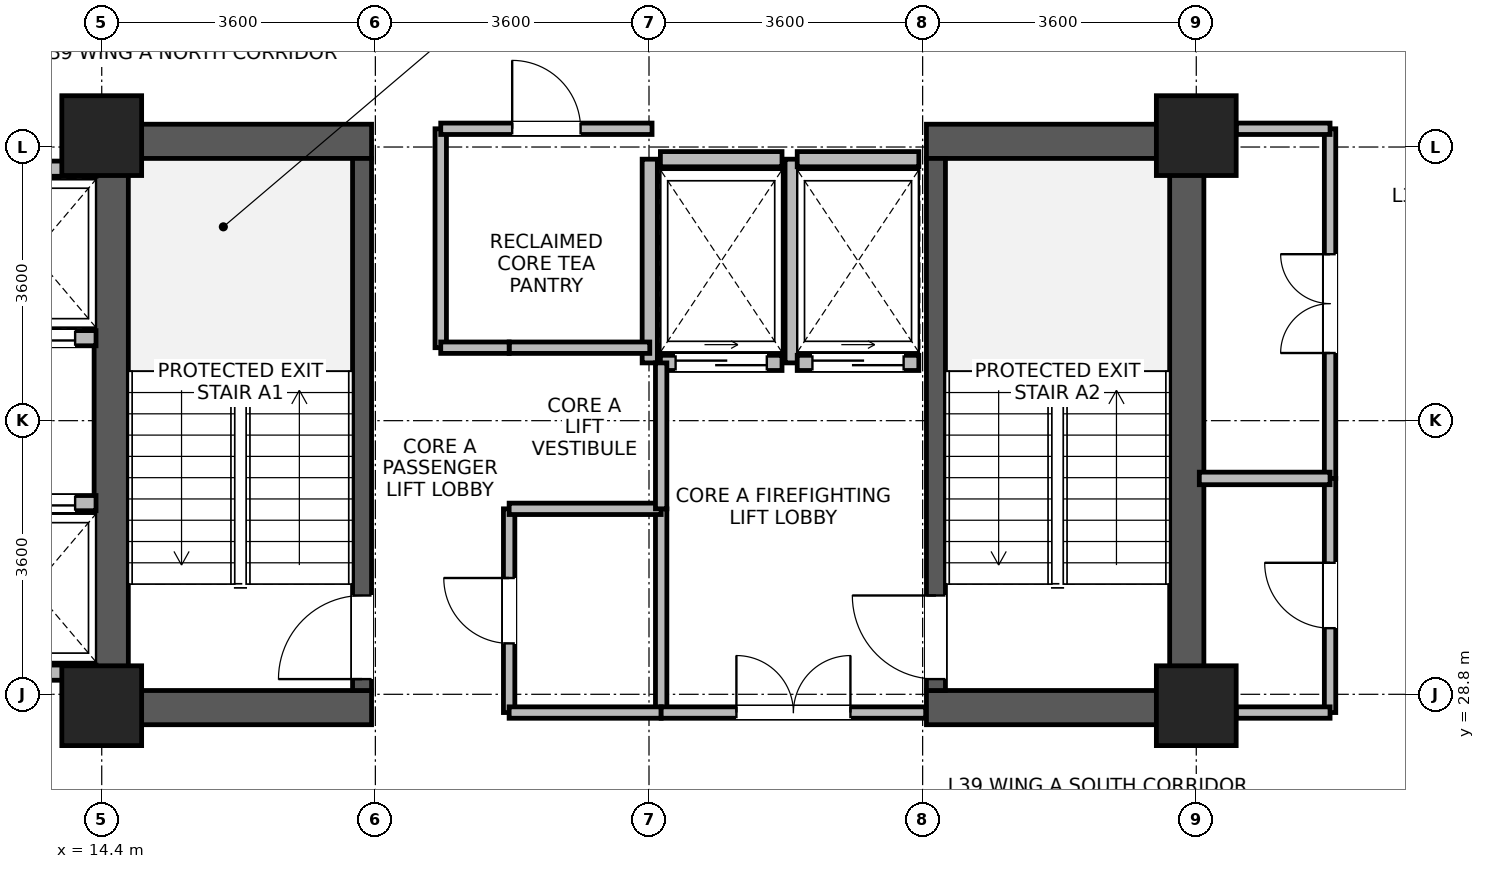
"""IFC4 building model, lengths in metres.
Left out: names, types, materials, properties, quantities, classifications, styles, units other than length and angle.
Written with IfcOpenShell. Run it as: python <this file> out.ifc"""

import sys

from ifc_helpers import new_model, si_unit, direction, frame, frame_2d, origin, origin_2d, place, context, subcontext, project, spatial, rectangle, extrude, source, transform, mapped, element, fill, save


model = new_model("IFC4")
c1 = context("Model", 3, precision=1e-05, world=origin(), true_north=direction((0.0, 1.0)))
c2 = subcontext(c1, "Body", "Model", "MODEL_VIEW")
j1 = project(units=[si_unit("LENGTHUNIT", "METRE"), si_unit("PLANEANGLEUNIT", "RADIAN")], contexts=[c1])
p1 = place(None, origin())
s1 = spatial("IfcSite", under=j1, at=p1, CompositionType="ELEMENT")
p2 = place(p1, origin())
s2 = spatial("IfcBuilding", under=s1, at=p2, CompositionType="ELEMENT")
p3 = place(p2, frame((0.0, 0.0, 155.0)))
s3 = spatial("IfcBuildingStorey", under=s2, at=p3, CompositionType="ELEMENT", Elevation=155.0)
for number, where, z_axis, x_axis in (
    (1, (14.525, 28.4, 0.0), (0.0, 0.0, 1.0), (0.0, 1.0, 0.0)),
    (2, (28.675, 28.4, 0.0), (0.0, 0.0, 1.0), (0.0, 1.0, 0.0)),
):
    element("IfcWall", number, at=place(p3, frame(where, z_axis=z_axis, x_axis=x_axis)), inside=s3, PredefinedType="SHEAR", context=c2, shape_type="SweptSolid", body=[
        extrude(rectangle(XDim=7.9, YDim=0.45, at=frame_2d((3.95, 0.0))), origin(), (0.0, 0.0, 1.0), 3.46),
    ])
for number, where, z_axis, x_axis in (
    (3, (14.75, 28.625, 0.0), (0.0, 0.0, 1.0), (1.0, 0.0, 0.0)),
    (4, (25.25, 28.625, 0.0), (0.0, 0.0, 1.0), (1.0, 0.0, 0.0)),
    (5, (14.75, 36.075, 0.0), (0.0, 0.0, 1.0), (1.0, 0.0, 0.0)),
    (6, (25.25, 36.075, 0.0), (0.0, 0.0, 1.0), (1.0, 0.0, 0.0)),
):
    element("IfcWall", number, at=place(p3, frame(where, z_axis=z_axis, x_axis=x_axis)), inside=s3, PredefinedType="SHEAR", context=c2, shape_type="SweptSolid", body=[
        extrude(rectangle(XDim=3.2, YDim=0.45, at=frame_2d((1.6, 0.0))), origin(), (0.0, 0.0, 1.0), 3.46),
    ])
p4 = place(p3, frame((17.825, 28.85, 0.0), z_axis=(0.0, 0.0, 1.0), x_axis=(0.0, 1.0, 0.0)))
e7 = element("IfcWall", 7, at=p4, inside=s3, PredefinedType="SHEAR", context=c2, shape_type="SweptSolid", body=[
    extrude(rectangle(XDim=7.0, YDim=0.25, at=frame_2d((3.5, 0.0))), origin(), (0.0, 0.0, 1.0), 3.46),
])
p5 = place(p4, frame((0.15, 0.0, 0.0)))
e8 = element("IfcOpeningElement", 8, at=p5, cuts=e7, PredefinedType="OPENING", context=c2, shape_type="SweptSolid", body=[
    extrude(rectangle(XDim=1.1, YDim=2.08, at=frame_2d((0.55, 1.04))), frame((0.0, 0.135, 0.0), z_axis=(0.0, -1.0, 0.0), x_axis=(1.0, 0.0, 0.0)), (0.0, 0.0, 1.0), 0.27),
])
p6 = place(p3, frame((25.375, 28.85, 0.0), z_axis=(0.0, 0.0, 1.0), x_axis=(0.0, 1.0, 0.0)))
e9 = element("IfcWall", 9, at=p6, inside=s3, PredefinedType="SHEAR", context=c2, shape_type="SweptSolid", body=[
    extrude(rectangle(XDim=7.0, YDim=0.25, at=frame_2d((3.5, 0.0))), origin(), (0.0, 0.0, 1.0), 3.46),
])
p7 = place(p6, frame((0.15, 0.0, 0.0)))
e10 = element("IfcOpeningElement", 10, at=p7, cuts=e9, PredefinedType="OPENING", context=c2, shape_type="SweptSolid", body=[
    extrude(rectangle(XDim=1.1, YDim=2.08, at=frame_2d((0.55, 1.04))), frame((0.0, 0.135, 0.0), z_axis=(0.0, -1.0, 0.0), x_axis=(1.0, 0.0, 0.0)), (0.0, 0.0, 1.0), 0.27),
])
m1 = source(origin(), c2, "Body", "SweptSolid", [
    extrude(rectangle(XDim=1.05, YDim=1.05, at=origin_2d()), origin(), (0.0, 0.0, 1.0), 3.7),
])
for number, where, z_axis, x_axis in (
    (11, (14.4, 28.65, 0.0), (0.0, 0.0, 1.0), (1.0, 0.0, 0.0)),
    (12, (14.4, 36.15, 0.0), (0.0, 0.0, 1.0), (1.0, 0.0, 0.0)),
    (13, (28.8, 28.65, 0.0), (0.0, 0.0, 1.0), (1.0, 0.0, 0.0)),
    (14, (28.8, 36.15, 0.0), (0.0, 0.0, 1.0), (1.0, 0.0, 0.0)),
):
    element("IfcColumn", number, at=place(p3, frame(where, z_axis=z_axis, x_axis=x_axis)), inside=s3, PredefinedType="COLUMN", context=c2, shape_type="MappedRepresentation", body=[
        mapped(m1, transform((0.0, 0.0, 0.0), x_axis=(1.0, 0.0, 0.0), y_axis=(0.0, 1.0, 0.0), z_axis=(0.0, 0.0, 1.0), scale=1.0)),
    ])
p8 = place(p3, frame((12.675, 33.485, 0.0), z_axis=(0.0, 0.0, 1.0), x_axis=(1.0, 0.0, 0.0)))
e15 = element("IfcWall", 15, at=p8, inside=s3, PredefinedType="PARTITIONING", context=c2, shape_type="SweptSolid", body=[
    extrude(rectangle(XDim=1.65, YDim=0.2, at=frame_2d((0.825, 0.0))), origin(), (0.0, 0.0, 1.0), 3.44),
])
p9 = place(p8, frame((0.275, 0.0, 0.0)))
e16 = element("IfcOpeningElement", 16, at=p9, cuts=e15, PredefinedType="OPENING", context=c2, shape_type="SweptSolid", body=[
    extrude(rectangle(XDim=1.1, YDim=2.12, at=frame_2d((0.55, 1.06))), frame((0.0, 0.11, 0.0), z_axis=(0.0, -1.0, 0.0), x_axis=(1.0, 0.0, 0.0)), (0.0, 0.0, 1.0), 0.22),
])
for number, where, z_axis, x_axis in (
    (17, (12.675, 35.715, 0.0), (0.0, 0.0, 1.0), (1.0, 0.0, 0.0)),
    (18, (12.675, 29.085, 0.0), (0.0, 0.0, 1.0), (1.0, 0.0, 0.0)),
):
    element("IfcWall", number, at=place(p3, frame(where, z_axis=z_axis, x_axis=x_axis)), inside=s3, PredefinedType="PARTITIONING", context=c2, shape_type="SweptSolid", body=[
        extrude(rectangle(XDim=1.65, YDim=0.2, at=frame_2d((0.825, 0.0))), origin(), (0.0, 0.0, 1.0), 3.44),
    ])
p10 = place(p3, frame((12.675, 31.315, 0.0), z_axis=(0.0, 0.0, 1.0), x_axis=(1.0, 0.0, 0.0)))
e19 = element("IfcWall", 19, at=p10, inside=s3, PredefinedType="PARTITIONING", context=c2, shape_type="SweptSolid", body=[
    extrude(rectangle(XDim=1.65, YDim=0.2, at=frame_2d((0.825, 0.0))), origin(), (0.0, 0.0, 1.0), 3.44),
])
p11 = place(p10, frame((0.275, 0.0, 0.0)))
e20 = element("IfcOpeningElement", 20, at=p11, cuts=e19, PredefinedType="OPENING", context=c2, shape_type="SweptSolid", body=[
    extrude(rectangle(XDim=1.1, YDim=2.12, at=frame_2d((0.55, 1.06))), frame((0.0, 0.11, 0.0), z_axis=(0.0, -1.0, 0.0), x_axis=(1.0, 0.0, 0.0)), (0.0, 0.0, 1.0), 0.22),
])
p12 = place(p3, frame((21.75, 33.16, 0.0), z_axis=(0.0, 0.0, 1.0), x_axis=(1.0, 0.0, 0.0)))
e21 = element("IfcWall", 21, at=p12, inside=s3, PredefinedType="PARTITIONING", context=c2, shape_type="SweptSolid", body=[
    extrude(rectangle(XDim=1.6, YDim=0.2, at=frame_2d((0.8, 0.0))), origin(), (0.0, 0.0, 1.0), 3.44),
])
p13 = place(p12, frame((0.2, 0.0, 0.0)))
e22 = element("IfcOpeningElement", 22, at=p13, cuts=e21, PredefinedType="OPENING", context=c2, shape_type="SweptSolid", body=[
    extrude(rectangle(XDim=1.2, YDim=2.12, at=frame_2d((0.6, 1.06))), frame((0.0, 0.11, 0.0), z_axis=(0.0, -1.0, 0.0), x_axis=(1.0, 0.0, 0.0)), (0.0, 0.0, 1.0), 0.22),
])
p14 = place(p3, frame((21.75, 35.84, 0.0), z_axis=(0.0, 0.0, 1.0), x_axis=(1.0, 0.0, 0.0)))
e23 = element("IfcWall", 23, at=p14, inside=s3, PredefinedType="PARTITIONING", context=c2, shape_type="SweptSolid", body=[
    extrude(rectangle(XDim=1.6, YDim=0.2, at=frame_2d((0.8, 0.0))), origin(), (0.0, 0.0, 1.0), 2.44),
])
for number, where, z_axis, x_axis in (
    (24, (21.61, 33.16, 0.0), (0.0, 0.0, 1.0), (0.0, 1.0, 0.0)),
    (25, (23.49, 33.16, 0.0), (0.0, 0.0, 1.0), (0.0, 1.0, 0.0)),
):
    element("IfcWall", number, at=place(p3, frame(where, z_axis=z_axis, x_axis=x_axis)), inside=s3, PredefinedType="PARTITIONING", context=c2, shape_type="SweptSolid", body=[
        extrude(rectangle(XDim=2.68, YDim=0.2, at=frame_2d((1.34, 0.0))), origin(), (0.0, 0.0, 1.0), 3.44),
    ])
p15 = place(p3, frame((23.55, 33.16, 0.0), z_axis=(0.0, 0.0, 1.0), x_axis=(1.0, 0.0, 0.0)))
e26 = element("IfcWall", 26, at=p15, inside=s3, PredefinedType="PARTITIONING", context=c2, shape_type="SweptSolid", body=[
    extrude(rectangle(XDim=1.6, YDim=0.2, at=frame_2d((0.8, 0.0))), origin(), (0.0, 0.0, 1.0), 3.44),
])
p16 = place(p15, frame((0.2, 0.0, 0.0)))
e27 = element("IfcOpeningElement", 27, at=p16, cuts=e26, PredefinedType="OPENING", context=c2, shape_type="SweptSolid", body=[
    extrude(rectangle(XDim=1.2, YDim=2.12, at=frame_2d((0.6, 1.06))), frame((0.0, 0.11, 0.0), z_axis=(0.0, -1.0, 0.0), x_axis=(1.0, 0.0, 0.0)), (0.0, 0.0, 1.0), 0.22),
])
p17 = place(p3, frame((23.55, 35.84, 0.0), z_axis=(0.0, 0.0, 1.0), x_axis=(1.0, 0.0, 0.0)))
e28 = element("IfcWall", 28, at=p17, inside=s3, PredefinedType="PARTITIONING", context=c2, shape_type="SweptSolid", body=[
    extrude(rectangle(XDim=1.6, YDim=0.2, at=frame_2d((0.8, 0.0))), origin(), (0.0, 0.0, 1.0), 2.44),
])
p18 = place(p3, frame((30.56, 31.64, 0.0), z_axis=(0.0, 0.0, 1.0), x_axis=(0.0, 1.0, 0.0)))
e29 = element("IfcWall", 29, at=p18, inside=s3, PredefinedType="PARTITIONING", context=c2, shape_type="SweptSolid", body=[
    extrude(rectangle(XDim=4.6, YDim=0.15, at=frame_2d((2.3, 0.0))), origin(), (0.0, 0.0, 1.0), 3.44),
])
p19 = place(p18, frame((1.65, 0.0, 0.0)))
e30 = element("IfcOpeningElement", 30, at=p19, cuts=e29, PredefinedType="OPENING", context=c2, shape_type="SweptSolid", body=[
    extrude(rectangle(XDim=1.3, YDim=2.12, at=frame_2d((0.65, 1.06))), frame((0.0, 0.085, 0.0), z_axis=(0.0, -1.0, 0.0), x_axis=(1.0, 0.0, 0.0)), (0.0, 0.0, 1.0), 0.17),
])
p20 = place(p3, frame((30.56, 28.56, 0.0), z_axis=(0.0, 0.0, 1.0), x_axis=(0.0, 1.0, 0.0)))
e31 = element("IfcWall", 31, at=p20, inside=s3, PredefinedType="PARTITIONING", context=c2, shape_type="SweptSolid", body=[
    extrude(rectangle(XDim=3.08, YDim=0.15, at=frame_2d((1.54, 0.0))), origin(), (0.0, 0.0, 1.0), 3.44),
])
p21 = place(p20, frame((1.11, 0.0, 0.0)))
e32 = element("IfcOpeningElement", 32, at=p21, cuts=e31, PredefinedType="OPENING", context=c2, shape_type="SweptSolid", body=[
    extrude(rectangle(XDim=0.86, YDim=2.02, at=frame_2d((0.43, 1.01))), frame((0.0, 0.085, 0.0), z_axis=(0.0, -1.0, 0.0), x_axis=(1.0, 0.0, 0.0)), (0.0, 0.0, 1.0), 0.17),
])
p22 = place(p3, frame((18.86, 33.36, 0.0), z_axis=(0.0, 0.0, 1.0), x_axis=(0.0, 1.0, 0.0)))
e33 = element("IfcWall", 33, at=p22, inside=s3, PredefinedType="PARTITIONING", context=c2, shape_type="SweptSolid", body=[
    extrude(rectangle(XDim=2.88, YDim=0.15, at=frame_2d((1.44, 0.0))), origin(), (0.0, 0.0, 1.0), 3.44),
])
p23 = place(p3, frame((18.86, 36.24, 0.0), z_axis=(0.0, 0.0, 1.0), x_axis=(1.0, 0.0, 0.0)))
e34 = element("IfcWall", 34, at=p23, inside=s3, PredefinedType="PARTITIONING", context=c2, shape_type="SweptSolid", body=[
    extrude(rectangle(XDim=2.78, YDim=0.15, at=frame_2d((1.39, 0.0))), origin(), (0.0, 0.0, 1.0), 2.44),
])
p24 = place(p23, frame((0.94, 0.0, 0.0)))
e35 = element("IfcOpeningElement", 35, at=p24, cuts=e34, PredefinedType="OPENING", context=c2, shape_type="SweptSolid", body=[
    extrude(rectangle(XDim=0.9, YDim=2.08, at=frame_2d((0.45, 1.04))), frame((0.0, 0.085, 0.0), z_axis=(0.0, -1.0, 0.0), x_axis=(1.0, 0.0, 0.0)), (0.0, 0.0, 1.0), 0.17),
])
p25 = place(p3, frame((19.76, 28.56, 0.0), z_axis=(0.0, 0.0, 1.0), x_axis=(0.0, 1.0, 0.0)))
e36 = element("IfcWall", 36, at=p25, inside=s3, PredefinedType="PARTITIONING", context=c2, shape_type="SweptSolid", body=[
    extrude(rectangle(XDim=2.68, YDim=0.15, at=frame_2d((1.34, 0.0))), origin(), (0.0, 0.0, 1.0), 3.44),
])
p26 = place(p25, frame((0.91, 0.0, 0.0)))
e37 = element("IfcOpeningElement", 37, at=p26, cuts=e36, PredefinedType="OPENING", context=c2, shape_type="SweptSolid", body=[
    extrude(rectangle(XDim=0.86, YDim=2.02, at=frame_2d((0.43, 1.01))), frame((0.0, 0.085, 0.0), z_axis=(0.0, -1.0, 0.0), x_axis=(1.0, 0.0, 0.0)), (0.0, 0.0, 1.0), 0.17),
])
p27 = place(p3, frame((21.76, 28.56, 0.0), z_axis=(0.0, 0.0, 1.0), x_axis=(0.0, 1.0, 0.0)))
e38 = element("IfcWall", 38, at=p27, inside=s3, PredefinedType="PARTITIONING", context=c2, shape_type="SweptSolid", body=[
    extrude(rectangle(XDim=2.68, YDim=0.15, at=frame_2d((1.34, 0.0))), origin(), (0.0, 0.0, 1.0), 3.44),
])
p28 = place(p3, frame((19.76, 28.56, 0.0), z_axis=(0.0, 0.0, 1.0), x_axis=(1.0, 0.0, 0.0)))
e39 = element("IfcWall", 39, at=p28, inside=s3, PredefinedType="PARTITIONING", context=c2, shape_type="SweptSolid", body=[
    extrude(rectangle(XDim=2.0, YDim=0.15, at=frame_2d((1.0, 0.0))), origin(), (0.0, 0.0, 1.0), 2.44),
])
p29 = place(p3, frame((19.76, 31.24, 0.0), z_axis=(0.0, 0.0, 1.0), x_axis=(1.0, 0.0, 0.0)))
e40 = element("IfcWall", 40, at=p29, inside=s3, PredefinedType="PARTITIONING", context=c2, shape_type="SweptSolid", body=[
    extrude(rectangle(XDim=2.0, YDim=0.15, at=frame_2d((1.0, 0.0))), origin(), (0.0, 0.0, 1.0), 3.44),
])
p30 = place(p3, frame((19.76, 33.36, 0.0), z_axis=(0.0, 0.0, 1.0), x_axis=(1.0, 0.0, 0.0)))
e41 = element("IfcWall", 41, at=p30, inside=s3, PredefinedType="PARTITIONING", context=c2, shape_type="SweptSolid", body=[
    extrude(rectangle(XDim=1.85, YDim=0.15, at=frame_2d((0.925, 0.0))), origin(), (0.0, 0.0, 1.0), 3.44),
])
for number, where, z_axis, x_axis in (
    (42, (29.325, 28.56, 0.0), (0.0, 0.0, 1.0), (1.0, 0.0, 0.0)),
    (43, (29.325, 36.24, 0.0), (0.0, 0.0, 1.0), (1.0, 0.0, 0.0)),
):
    element("IfcWall", number, at=place(p3, frame(where, z_axis=z_axis, x_axis=x_axis)), inside=s3, PredefinedType="PARTITIONING", context=c2, shape_type="SweptSolid", body=[
        extrude(rectangle(XDim=1.235, YDim=0.15, at=frame_2d((0.618, 0.0))), origin(), (0.0, 0.0, 1.0), 2.84),
    ])
p31 = place(p3, frame((18.86, 33.36, 0.0), z_axis=(0.0, 0.0, 1.0), x_axis=(1.0, 0.0, 0.0)))
e44 = element("IfcWall", 44, at=p31, inside=s3, PredefinedType="PARTITIONING", context=c2, shape_type="SweptSolid", body=[
    extrude(rectangle(XDim=0.9, YDim=0.15, at=frame_2d((0.45, 0.0))), origin(), (0.0, 0.0, 1.0), 3.44),
])
p32 = place(p3, frame((21.76, 28.56, 0.0), z_axis=(0.0, 0.0, 1.0), x_axis=(1.0, 0.0, 0.0)))
e45 = element("IfcWall", 45, at=p32, inside=s3, PredefinedType="PARTITIONING", context=c2, shape_type="SweptSolid", body=[
    extrude(rectangle(XDim=3.48, YDim=0.15, at=frame_2d((1.74, 0.0))), origin(), (0.0, 0.0, 1.0), 2.44),
])
p33 = place(p32, frame((0.99, 0.0, 0.0)))
e46 = element("IfcOpeningElement", 46, at=p33, cuts=e45, PredefinedType="OPENING", context=c2, shape_type="SweptSolid", body=[
    extrude(rectangle(XDim=1.5, YDim=2.1, at=frame_2d((0.75, 1.05))), frame((0.0, 0.085, 0.0), z_axis=(0.0, -1.0, 0.0), x_axis=(1.0, 0.0, 0.0)), (0.0, 0.0, 1.0), 0.17),
])
p34 = place(p3, frame((21.76, 31.24, 0.0), z_axis=(0.0, 0.0, 1.0), x_axis=(0.0, 1.0, 0.0)))
e47 = element("IfcWall", 47, at=p34, inside=s3, PredefinedType="PARTITIONING", context=c2, shape_type="SweptSolid", body=[
    extrude(rectangle(XDim=1.92, YDim=0.15, at=frame_2d((0.96, 0.0))), origin(), (0.0, 0.0, 1.0), 3.44),
])
p35 = place(p3, frame((28.84, 31.64, 0.0), z_axis=(0.0, 0.0, 1.0), x_axis=(1.0, 0.0, 0.0)))
e48 = element("IfcWall", 48, at=p35, inside=s3, PredefinedType="PARTITIONING", context=c2, shape_type="SweptSolid", body=[
    extrude(rectangle(XDim=1.72, YDim=0.165, at=frame_2d((0.86, 0.0))), origin(), (0.0, 0.0, 1.0), 3.44),
])
p36 = place(p5, origin())
e49 = element("IfcDoor", 49, at=p36, inside=s3, OperationType="SINGLE_SWING_LEFT", PredefinedType="DOOR", context=c2, shape_type="SweptSolid", body=[
    extrude(rectangle(XDim=1.1, YDim=2.08, at=frame_2d((0.55, 1.04))), frame((0.0, 0.025, 0.0), z_axis=(0.0, -1.0, 0.0), x_axis=(1.0, 0.0, 0.0)), (0.0, 0.0, 1.0), 0.05),
])
fill(e8, e49)
p37 = place(p7, origin())
e50 = element("IfcDoor", 50, at=p37, inside=s3, OperationType="SINGLE_SWING_RIGHT", PredefinedType="DOOR", context=c2, shape_type="SweptSolid", body=[
    extrude(rectangle(XDim=1.1, YDim=2.08, at=frame_2d((0.55, 1.04))), frame((0.0, 0.025, 0.0), z_axis=(0.0, -1.0, 0.0), x_axis=(1.0, 0.0, 0.0)), (0.0, 0.0, 1.0), 0.05),
])
fill(e10, e50)
p38 = place(p9, origin())
e51 = element("IfcDoor", 51, at=p38, inside=s3, OperationType="SLIDING_TO_LEFT", PredefinedType="DOOR", context=c2, shape_type="SweptSolid", body=[
    extrude(rectangle(XDim=1.1, YDim=2.12, at=frame_2d((0.55, 1.06))), frame((0.0, 0.025, 0.0), z_axis=(0.0, -1.0, 0.0), x_axis=(1.0, 0.0, 0.0)), (0.0, 0.0, 1.0), 0.05),
])
fill(e16, e51)
p39 = place(p11, origin())
e52 = element("IfcDoor", 52, at=p39, inside=s3, OperationType="SLIDING_TO_LEFT", PredefinedType="DOOR", context=c2, shape_type="SweptSolid", body=[
    extrude(rectangle(XDim=1.1, YDim=2.12, at=frame_2d((0.55, 1.06))), frame((0.0, 0.025, 0.0), z_axis=(0.0, -1.0, 0.0), x_axis=(1.0, 0.0, 0.0)), (0.0, 0.0, 1.0), 0.05),
])
fill(e20, e52)
p40 = place(p13, origin())
e53 = element("IfcDoor", 53, at=p40, inside=s3, OperationType="SLIDING_TO_RIGHT", PredefinedType="DOOR", context=c2, shape_type="SweptSolid", body=[
    extrude(rectangle(XDim=1.2, YDim=2.12, at=frame_2d((0.6, 1.06))), frame((0.0, 0.025, 0.0), z_axis=(0.0, -1.0, 0.0), x_axis=(1.0, 0.0, 0.0)), (0.0, 0.0, 1.0), 0.05),
])
fill(e22, e53)
p41 = place(p16, origin())
e54 = element("IfcDoor", 54, at=p41, inside=s3, OperationType="SLIDING_TO_RIGHT", PredefinedType="DOOR", context=c2, shape_type="SweptSolid", body=[
    extrude(rectangle(XDim=1.2, YDim=2.12, at=frame_2d((0.6, 1.06))), frame((0.0, 0.025, 0.0), z_axis=(0.0, -1.0, 0.0), x_axis=(1.0, 0.0, 0.0)), (0.0, 0.0, 1.0), 0.05),
])
fill(e27, e54)
p42 = place(p19, origin())
e55 = element("IfcDoor", 55, at=p42, inside=s3, OperationType="DOUBLE_DOOR_SINGLE_SWING", PredefinedType="DOOR", context=c2, shape_type="SweptSolid", body=[
    extrude(rectangle(XDim=1.3, YDim=2.12, at=frame_2d((0.65, 1.06))), frame((0.0, 0.025, 0.0), z_axis=(0.0, -1.0, 0.0), x_axis=(1.0, 0.0, 0.0)), (0.0, 0.0, 1.0), 0.05),
])
fill(e30, e55)
p43 = place(p21, origin())
e56 = element("IfcDoor", 56, at=p43, inside=s3, OperationType="SINGLE_SWING_RIGHT", PredefinedType="DOOR", context=c2, shape_type="SweptSolid", body=[
    extrude(rectangle(XDim=0.86, YDim=2.02, at=frame_2d((0.43, 1.01))), frame((0.0, 0.025, 0.0), z_axis=(0.0, -1.0, 0.0), x_axis=(1.0, 0.0, 0.0)), (0.0, 0.0, 1.0), 0.05),
])
fill(e32, e56)
p44 = place(p24, origin())
e57 = element("IfcDoor", 57, at=p44, inside=s3, OperationType="SINGLE_SWING_LEFT", PredefinedType="DOOR", context=c2, shape_type="SweptSolid", body=[
    extrude(rectangle(XDim=0.9, YDim=2.08, at=frame_2d((0.45, 1.04))), frame((0.0, 0.025, 0.0), z_axis=(0.0, -1.0, 0.0), x_axis=(1.0, 0.0, 0.0)), (0.0, 0.0, 1.0), 0.05),
])
fill(e35, e57)
p45 = place(p26, origin())
e58 = element("IfcDoor", 58, at=p45, inside=s3, OperationType="SINGLE_SWING_RIGHT", PredefinedType="DOOR", context=c2, shape_type="SweptSolid", body=[
    extrude(rectangle(XDim=0.86, YDim=2.02, at=frame_2d((0.43, 1.01))), frame((0.0, 0.025, 0.0), z_axis=(0.0, -1.0, 0.0), x_axis=(1.0, 0.0, 0.0)), (0.0, 0.0, 1.0), 0.05),
])
fill(e37, e58)
p46 = place(p33, origin())
e59 = element("IfcDoor", 59, at=p46, inside=s3, OperationType="DOUBLE_DOOR_SINGLE_SWING", PredefinedType="DOOR", context=c2, shape_type="SweptSolid", body=[
    extrude(rectangle(XDim=1.5, YDim=2.1, at=frame_2d((0.75, 1.05))), frame((0.0, 0.025, 0.0), z_axis=(0.0, -1.0, 0.0), x_axis=(1.0, 0.0, 0.0)), (0.0, 0.0, 1.0), 0.05),
])
fill(e46, e59)
save(model, sys.argv[1])
